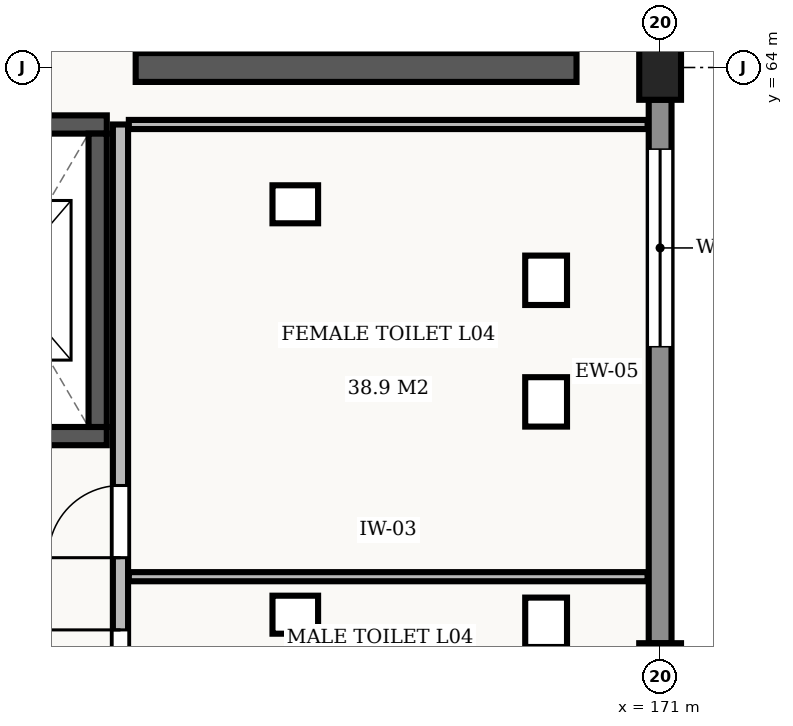
"""IFC4 building model, lengths in metres.
Left out: names, types, materials, properties, quantities, classifications, styles, units other than length and angle.
Written with IfcOpenShell. Run it as: python <this file> out.ifc"""

import sys

from ifc_helpers import new_model, si_unit, direction, frame, frame_2d, origin, origin_2d, place, context, subcontext, project, spatial, rectangle, extrude, element, fill, save


model = new_model("IFC4")
c1 = context("Model", 3, precision=1e-05, world=origin(), true_north=direction((0.0, 1.0)))
c2 = subcontext(c1, "Body", "Model", "MODEL_VIEW")
j1 = project(units=[si_unit("LENGTHUNIT", "METRE"), si_unit("PLANEANGLEUNIT", "RADIAN")], contexts=[c1])
p1 = place(None, origin())
s1 = spatial("IfcSite", under=j1, at=p1, CompositionType="ELEMENT")
p2 = place(p1, origin())
s2 = spatial("IfcBuilding", under=s1, at=p2, CompositionType="ELEMENT")
p3 = place(p2, frame((0.0, 0.0, 18.6)))
s3 = spatial("IfcBuildingStorey", under=s2, at=p3, CompositionType="ELEMENT", Elevation=18.6)
for number, where, z_axis, x_axis in (
    (1, (171.0, 56.0, 0.0), (0.0, 0.0, 1.0), (1.0, 0.0, 0.0)),
    (2, (171.0, 64.0, 0.0), (0.0, 0.0, 1.0), (1.0, 0.0, 0.0)),
):
    element("IfcColumn", number, at=place(p3, frame(where, z_axis=z_axis, x_axis=x_axis)), inside=s3, PredefinedType="COLUMN", context=c2, shape_type="SweptSolid", body=[
        extrude(rectangle(XDim=0.55, YDim=0.85, at=origin_2d()), origin(), (0.0, 0.0, 1.0), 4.2),
    ])
p4 = place(p3, frame((171.0, 63.577, 0.0), z_axis=(0.0, 0.0, 1.0), x_axis=(0.0, -1.0, 0.0)))
e3 = element("IfcWall", 3, at=p4, inside=s3, PredefinedType="STANDARD", context=c2, shape_type="SweptSolid", body=[
    extrude(rectangle(XDim=7.154, YDim=0.3, at=frame_2d((3.577, 0.0))), origin(), (0.0, 0.0, 1.0), 3.44),
])
p5 = place(p4, frame((0.651, 0.0, 0.9)))
e4 = element("IfcOpeningElement", 4, at=p5, cuts=e3, PredefinedType="OPENING", context=c2, shape_type="SweptSolid", body=[
    extrude(rectangle(XDim=2.6, YDim=1.6, at=frame_2d((1.3, 0.8))), frame((0.0, 0.162, 0.0), z_axis=(0.0, -1.0, 0.0), x_axis=(1.0, 0.0, 0.0)), (0.0, 0.0, 1.0), 0.324),
])
p6 = place(p3, frame((160.975, 59.15, 0.0), z_axis=(0.0, 0.0, 1.0), x_axis=(1.0, 0.0, 0.0)))
e5 = element("IfcWall", 5, at=p6, inside=s3, PredefinedType="SHEAR", context=c2, shape_type="SweptSolid", body=[
    extrude(rectangle(XDim=2.745, YDim=0.24, at=frame_2d((1.373, 0.0))), origin(), (0.0, 0.0, 1.0), 3.91),
])
p7 = place(p6, frame((0.825, 0.0, 0.0)))
e6 = element("IfcOpeningElement", 6, at=p7, cuts=e5, PredefinedType="OPENING", context=c2, shape_type="SweptSolid", body=[
    extrude(rectangle(XDim=1.1, YDim=2.2, at=frame_2d((0.55, 1.1))), frame((0.0, 0.132, 0.0), z_axis=(0.0, -1.0, 0.0), x_axis=(1.0, 0.0, 0.0)), (0.0, 0.0, 1.0), 0.264),
])
p8 = place(p3, frame((163.72, 63.25, 0.0), z_axis=(0.0, 0.0, 1.0), x_axis=(-1.0, 0.0, 0.0)))
e7 = element("IfcWall", 7, at=p8, inside=s3, PredefinedType="SHEAR", context=c2, shape_type="SweptSolid", body=[
    extrude(rectangle(XDim=2.745, YDim=0.24, at=frame_2d((1.373, 0.0))), origin(), (0.0, 0.0, 1.0), 3.91),
])
p9 = place(p3, frame((163.6, 59.27, 0.0), z_axis=(0.0, 0.0, 1.0), x_axis=(0.0, 1.0, 0.0)))
e8 = element("IfcWall", 8, at=p9, inside=s3, PredefinedType="SHEAR", context=c2, shape_type="SweptSolid", body=[
    extrude(rectangle(XDim=3.86, YDim=0.24, at=frame_2d((1.93, 0.0))), origin(), (0.0, 0.0, 1.0), 3.91),
])
p10 = place(p3, frame((164.1, 64.0, 0.0), z_axis=(0.0, 0.0, 1.0), x_axis=(1.0, 0.0, 0.0)))
e9 = element("IfcWall", 9, at=p10, inside=s3, PredefinedType="SHEAR", context=c2, shape_type="SweptSolid", body=[
    extrude(rectangle(XDim=5.8, YDim=0.38, at=frame_2d((2.9, 0.0))), origin(), (0.0, 0.0, 1.0), 2.96),
])
p11 = place(p3, frame((163.9, 52.95, 0.0), z_axis=(0.0, 0.0, 1.0), x_axis=(0.0, 1.0, 0.0)))
e10 = element("IfcWall", 10, at=p11, inside=s3, PredefinedType="STANDARD", context=c2, shape_type="SweptSolid", body=[
    extrude(rectangle(XDim=10.3, YDim=0.2, at=frame_2d((5.15, 0.0))), origin(), (0.0, 0.0, 1.0), 3.91),
])
p12 = place(p11, frame((0.55, 0.0, 0.0)))
e11 = element("IfcOpeningElement", 11, at=p12, cuts=e10, PredefinedType="OPENING", context=c2, shape_type="SweptSolid", body=[
    extrude(rectangle(XDim=1.0, YDim=2.1, at=frame_2d((0.5, 1.05))), frame((0.0, 0.112, 0.0), z_axis=(0.0, -1.0, 0.0), x_axis=(1.0, 0.0, 0.0)), (0.0, 0.0, 1.0), 0.224),
])
p13 = place(p11, frame((2.7, 0.0, 0.0)))
e12 = element("IfcOpeningElement", 12, at=p13, cuts=e10, PredefinedType="OPENING", context=c2, shape_type="SweptSolid", body=[
    extrude(rectangle(XDim=0.95, YDim=2.1, at=frame_2d((0.475, 1.05))), frame((0.0, 0.112, 0.0), z_axis=(0.0, -1.0, 0.0), x_axis=(1.0, 0.0, 0.0)), (0.0, 0.0, 1.0), 0.224),
])
p14 = place(p11, frame((4.6, 0.0, 0.0)))
e13 = element("IfcOpeningElement", 13, at=p14, cuts=e10, PredefinedType="OPENING", context=c2, shape_type="SweptSolid", body=[
    extrude(rectangle(XDim=0.95, YDim=2.1, at=frame_2d((0.475, 1.05))), frame((0.0, 0.112, 0.0), z_axis=(0.0, -1.0, 0.0), x_axis=(1.0, 0.0, 0.0)), (0.0, 0.0, 1.0), 0.224),
])
for number, where, z_axis, x_axis in (
    (14, (164.01, 57.3, 0.0), (0.0, 0.0, 1.0), (1.0, 0.0, 0.0)),
    (15, (164.01, 63.25, 0.0), (0.0, 0.0, 1.0), (1.0, 0.0, 0.0)),
):
    element("IfcWall", number, at=place(p3, frame(where, z_axis=z_axis, x_axis=x_axis)), inside=s3, PredefinedType="STANDARD", context=c2, shape_type="SweptSolid", body=[
        extrude(rectangle(XDim=6.825, YDim=0.12, at=frame_2d((3.413, 0.0))), origin(), (0.0, 0.0, 1.0), 3.91),
    ])
p15 = place(p5, origin())
e16 = element("IfcWindow", 16, at=p15, inside=s3, PartitioningType="SINGLE_PANEL", PredefinedType="WINDOW", context=c2, shape_type="SweptSolid", body=[
    extrude(rectangle(XDim=2.6, YDim=1.6, at=frame_2d((1.3, 0.8))), frame((0.0, 0.03, 0.0), z_axis=(0.0, -1.0, 0.0), x_axis=(1.0, 0.0, 0.0)), (0.0, 0.0, 1.0), 0.06),
])
fill(e4, e16)
p16 = place(p13, origin())
e17 = element("IfcDoor", 17, at=p16, inside=s3, OperationType="SINGLE_SWING_RIGHT", PredefinedType="DOOR", context=c2, shape_type="SweptSolid", body=[
    extrude(rectangle(XDim=0.95, YDim=2.1, at=frame_2d((0.475, 1.05))), frame((0.0, 0.025, 0.0), z_axis=(0.0, -1.0, 0.0), x_axis=(1.0, 0.0, 0.0)), (0.0, 0.0, 1.0), 0.05),
])
fill(e12, e17)
p17 = place(p14, origin())
e18 = element("IfcDoor", 18, at=p17, inside=s3, OperationType="SINGLE_SWING_LEFT", PredefinedType="DOOR", context=c2, shape_type="SweptSolid", body=[
    extrude(rectangle(XDim=0.95, YDim=2.1, at=frame_2d((0.475, 1.05))), frame((0.0, 0.025, 0.0), z_axis=(0.0, -1.0, 0.0), x_axis=(1.0, 0.0, 0.0)), (0.0, 0.0, 1.0), 0.05),
])
fill(e13, e18)
save(model, sys.argv[1])
